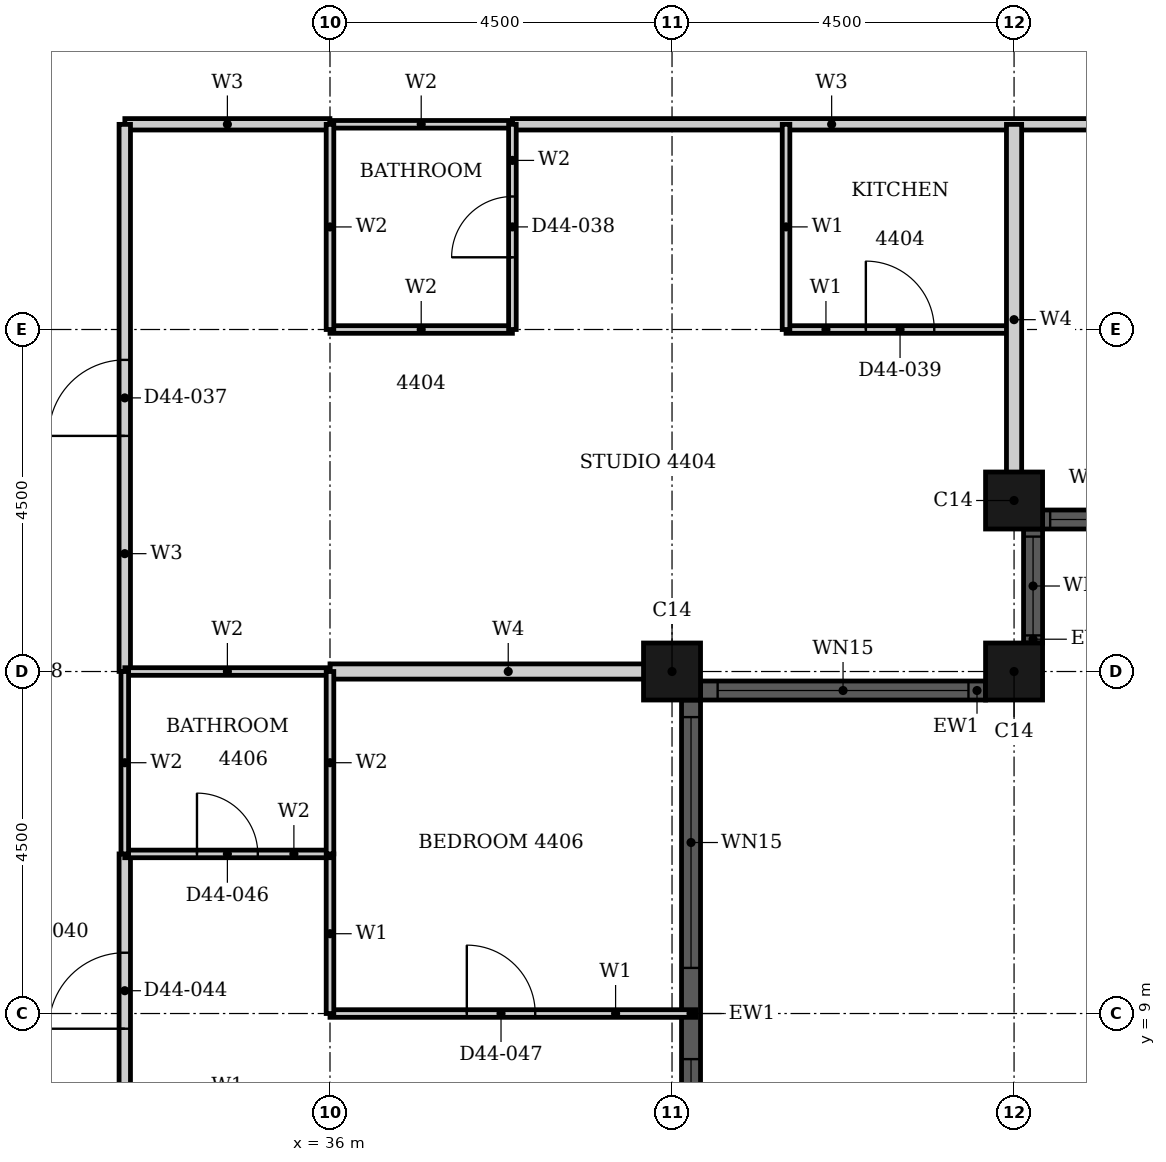
"""IFC4 building model, lengths in metres.
Left out: names, types, materials, properties, quantities, classifications, styles, units other than length and angle.
Written with IfcOpenShell. Run it as: python <this file> out.ifc"""

import sys

from ifc_helpers import new_model, si_unit, direction, frame, frame_2d, origin, origin_2d, place, context, subcontext, project, spatial, rectangle, hollow_rectangle, extrude, element, fill, save


model = new_model("IFC4")
c1 = context("Model", 3, precision=1e-05, world=origin(), true_north=direction((0.0, 1.0)))
c2 = subcontext(c1, "Body", "Model", "MODEL_VIEW")
j1 = project(units=[si_unit("LENGTHUNIT", "METRE"), si_unit("PLANEANGLEUNIT", "RADIAN")], contexts=[c1])
p1 = place(None, origin())
s1 = spatial("IfcSite", under=j1, at=p1, CompositionType="ELEMENT")
p2 = place(p1, origin())
s2 = spatial("IfcBuilding", under=s1, at=p2, CompositionType="ELEMENT")
p3 = place(p2, frame((0.0, 0.0, 176.5)))
s3 = spatial("IfcBuildingStorey", under=s2, at=p3, CompositionType="ELEMENT", Elevation=176.5)
for number, where, z_axis, x_axis in (
    (1, (40.5, 13.5, 0.0), (0.0, 0.0, 1.0), (1.0, 0.0, 0.0)),
    (2, (45.0, 13.5, 0.0), (0.0, 0.0, 1.0), (1.0, 0.0, 0.0)),
    (3, (45.0, 15.75, 0.0), (0.0, 0.0, 1.0), (1.0, 0.0, 0.0)),
):
    element("IfcColumn", number, at=place(p3, frame(where, z_axis=z_axis, x_axis=x_axis)), inside=s3, PredefinedType="COLUMN", context=c2, shape_type="SweptSolid", body=[
        extrude(hollow_rectangle(XDim=0.75, YDim=0.75, WallThickness=0.024, at=origin_2d()), origin(), (0.0, 0.0, 1.0), 3.7),
    ])
p4 = place(p3, frame((40.75, 4.875, 0.0), z_axis=(0.0, 0.0, 1.0), x_axis=(0.0, 1.0, 0.0)))
e4 = element("IfcWall", 4, at=p4, inside=s3, PredefinedType="SOLIDWALL", context=c2, shape_type="SweptSolid", body=[
    extrude(rectangle(XDim=8.25, YDim=0.25, at=frame_2d((4.125, 0.0))), origin(), (0.0, 0.0, 1.0), 3.7),
])
p5 = place(p4, frame((0.225, 0.0, 0.45)))
e5 = element("IfcOpeningElement", 5, at=p5, cuts=e4, PredefinedType="OPENING", context=c2, shape_type="SweptSolid", body=[
    extrude(rectangle(XDim=3.3, YDim=2.3, at=frame_2d((1.65, 1.15))), frame((0.0, 0.135, 0.0), z_axis=(0.0, -1.0, 0.0), x_axis=(1.0, 0.0, 0.0)), (0.0, 0.0, 1.0), 0.27),
])
p6 = place(p4, frame((4.725, 0.0, 0.45)))
e6 = element("IfcOpeningElement", 6, at=p6, cuts=e4, PredefinedType="OPENING", context=c2, shape_type="SweptSolid", body=[
    extrude(rectangle(XDim=3.3, YDim=2.3, at=frame_2d((1.65, 1.15))), frame((0.0, 0.135, 0.0), z_axis=(0.0, -1.0, 0.0), x_axis=(1.0, 0.0, 0.0)), (0.0, 0.0, 1.0), 0.27),
])
p7 = place(p3, frame((40.875, 13.25, 0.0), z_axis=(0.0, 0.0, 1.0), x_axis=(1.0, 0.0, 0.0)))
e7 = element("IfcWall", 7, at=p7, inside=s3, PredefinedType="SOLIDWALL", context=c2, shape_type="SweptSolid", body=[
    extrude(rectangle(XDim=3.75, YDim=0.25, at=frame_2d((1.875, 0.0))), origin(), (0.0, 0.0, 1.0), 3.7),
])
p8 = place(p7, frame((0.225, 0.0, 0.45)))
e8 = element("IfcOpeningElement", 8, at=p8, cuts=e7, PredefinedType="OPENING", context=c2, shape_type="SweptSolid", body=[
    extrude(rectangle(XDim=3.3, YDim=2.3, at=frame_2d((1.65, 1.15))), frame((0.0, 0.135, 0.0), z_axis=(0.0, -1.0, 0.0), x_axis=(1.0, 0.0, 0.0)), (0.0, 0.0, 1.0), 0.27),
])
p9 = place(p3, frame((45.25, 13.875, 0.0), z_axis=(0.0, 0.0, 1.0), x_axis=(0.0, 1.0, 0.0)))
e9 = element("IfcWall", 9, at=p9, inside=s3, PredefinedType="SOLIDWALL", context=c2, shape_type="SweptSolid", body=[
    extrude(rectangle(XDim=1.5, YDim=0.25, at=frame_2d((0.75, 0.0))), origin(), (0.0, 0.0, 1.0), 3.7),
])
p10 = place(p9, frame((0.1, 0.0, 0.9)))
e10 = element("IfcOpeningElement", 10, at=p10, cuts=e9, PredefinedType="OPENING", context=c2, shape_type="SweptSolid", body=[
    extrude(rectangle(XDim=1.3, YDim=1.85, at=frame_2d((0.65, 0.925))), frame((0.0, 0.135, 0.0), z_axis=(0.0, -1.0, 0.0), x_axis=(1.0, 0.0, 0.0)), (0.0, 0.0, 1.0), 0.27),
])
p11 = place(p3, frame((45.375, 15.5, 0.0), z_axis=(0.0, 0.0, 1.0), x_axis=(1.0, 0.0, 0.0)))
e11 = element("IfcWall", 11, at=p11, inside=s3, PredefinedType="SOLIDWALL", context=c2, shape_type="SweptSolid", body=[
    extrude(rectangle(XDim=1.5, YDim=0.25, at=frame_2d((0.75, 0.0))), origin(), (0.0, 0.0, 1.0), 3.7),
])
p12 = place(p11, frame((0.1, 0.0, 0.9)))
e12 = element("IfcOpeningElement", 12, at=p12, cuts=e11, PredefinedType="OPENING", context=c2, shape_type="SweptSolid", body=[
    extrude(rectangle(XDim=1.3, YDim=1.85, at=frame_2d((0.65, 0.925))), frame((0.0, 0.135, 0.0), z_axis=(0.0, -1.0, 0.0), x_axis=(1.0, 0.0, 0.0)), (0.0, 0.0, 1.0), 0.27),
])
p13 = place(p3, frame((33.301, 20.7, 0.0), z_axis=(0.0, 0.0, 1.0), x_axis=(1.0, 0.0, 0.0)))
e13 = element("IfcWall", 13, at=p13, inside=s3, PredefinedType="PARTITIONING", context=c2, shape_type="SweptSolid", body=[
    extrude(rectangle(XDim=2.698, YDim=0.15, at=frame_2d((1.349, 0.0))), origin(), (0.0, 0.0, 1.0), 3.4),
])
p14 = place(p3, frame((38.4, 20.7, 0.0), z_axis=(0.0, 0.0, 1.0), x_axis=(1.0, 0.0, 0.0)))
e14 = element("IfcWall", 14, at=p14, inside=s3, PredefinedType="PARTITIONING", context=c2, shape_type="SweptSolid", body=[
    extrude(rectangle(XDim=8.4, YDim=0.15, at=frame_2d((4.2, 0.0))), origin(), (0.0, 0.0, 1.0), 3.4),
])
p15 = place(p3, frame((33.3, 4.5, 0.0), z_axis=(0.0, 0.0, 1.0), x_axis=(0.0, 1.0, 0.0)))
e15 = element("IfcWall", 15, at=p15, inside=s3, PredefinedType="PARTITIONING", context=c2, shape_type="SweptSolid", body=[
    extrude(rectangle(XDim=6.6, YDim=0.15, at=frame_2d((3.3, 0.0))), origin(), (0.0, 0.0, 1.0), 3.4),
])
p16 = place(p15, frame((4.3, 0.0, 0.0)))
e16 = element("IfcOpeningElement", 16, at=p16, cuts=e15, PredefinedType="OPENING", context=c2, shape_type="SweptSolid", body=[
    extrude(rectangle(XDim=1.0, YDim=2.2, at=frame_2d((0.5, 1.1))), frame((0.0, 0.085, 0.0), z_axis=(0.0, -1.0, 0.0), x_axis=(1.0, 0.0, 0.0)), (0.0, 0.0, 1.0), 0.17),
])
p17 = place(p3, frame((33.3, 13.501, 0.0), z_axis=(0.0, 0.0, 1.0), x_axis=(0.0, 1.0, 0.0)))
e17 = element("IfcWall", 17, at=p17, inside=s3, PredefinedType="PARTITIONING", context=c2, shape_type="SweptSolid", body=[
    extrude(rectangle(XDim=7.198, YDim=0.15, at=frame_2d((3.599, 0.0))), origin(), (0.0, 0.0, 1.0), 3.4),
])
p18 = place(p17, frame((3.099, 0.0, 0.0)))
e18 = element("IfcOpeningElement", 18, at=p18, cuts=e17, PredefinedType="OPENING", context=c2, shape_type="SweptSolid", body=[
    extrude(rectangle(XDim=1.0, YDim=2.2, at=frame_2d((0.5, 1.1))), frame((0.0, 0.085, 0.0), z_axis=(0.0, -1.0, 0.0), x_axis=(1.0, 0.0, 0.0)), (0.0, 0.0, 1.0), 0.17),
])
p19 = place(p3, frame((42.0, 18.0, 0.0), z_axis=(0.0, 0.0, 1.0), x_axis=(1.0, 0.0, 0.0)))
e19 = element("IfcWall", 19, at=p19, inside=s3, PredefinedType="PARTITIONING", context=c2, shape_type="SweptSolid", body=[
    extrude(rectangle(XDim=3.0, YDim=0.1, at=frame_2d((1.5, 0.0))), origin(), (0.0, 0.0, 1.0), 3.4),
])
p20 = place(p19, frame((1.05, 0.0, 0.0)))
e20 = element("IfcOpeningElement", 20, at=p20, cuts=e19, PredefinedType="OPENING", context=c2, shape_type="SweptSolid", body=[
    extrude(rectangle(XDim=0.9, YDim=2.1, at=frame_2d((0.45, 1.05))), frame((0.0, 0.06, 0.0), z_axis=(0.0, -1.0, 0.0), x_axis=(1.0, 0.0, 0.0)), (0.0, 0.0, 1.0), 0.12),
])
p21 = place(p3, frame((36.0, 9.0, 0.0), z_axis=(0.0, 0.0, 1.0), x_axis=(1.0, 0.0, 0.0)))
e21 = element("IfcWall", 21, at=p21, inside=s3, PredefinedType="PARTITIONING", context=c2, shape_type="SweptSolid", body=[
    extrude(rectangle(XDim=4.815, YDim=0.1, at=frame_2d((2.407, 0.0))), origin(), (0.0, 0.0, 1.0), 3.4),
])
p22 = place(p21, frame((1.8, 0.0, 0.0)))
e22 = element("IfcOpeningElement", 22, at=p22, cuts=e21, PredefinedType="OPENING", context=c2, shape_type="SweptSolid", body=[
    extrude(rectangle(XDim=0.9, YDim=2.1, at=frame_2d((0.45, 1.05))), frame((0.0, 0.06, 0.0), z_axis=(0.0, -1.0, 0.0), x_axis=(1.0, 0.0, 0.0)), (0.0, 0.0, 1.0), 0.12),
])
p23 = place(p3, frame((36.0, 9.0, 0.0), z_axis=(0.0, 0.0, 1.0), x_axis=(0.0, 1.0, 0.0)))
e23 = element("IfcWall", 23, at=p23, inside=s3, PredefinedType="PARTITIONING", context=c2, shape_type="SweptSolid", body=[
    extrude(rectangle(XDim=2.1, YDim=0.1, at=frame_2d((1.05, 0.0))), origin(), (0.0, 0.0, 1.0), 2.68),
])
p24 = place(p3, frame((42.0, 18.0, 0.0), z_axis=(0.0, 0.0, 1.0), x_axis=(0.0, 1.0, 0.0)))
e24 = element("IfcWall", 24, at=p24, inside=s3, PredefinedType="PARTITIONING", context=c2, shape_type="SweptSolid", body=[
    extrude(rectangle(XDim=2.7, YDim=0.1, at=frame_2d((1.35, 0.0))), origin(), (0.0, 0.0, 1.0), 3.4),
])
p25 = place(p3, frame((36.0, 13.5, 0.0), z_axis=(0.0, 0.0, 1.0), x_axis=(1.0, 0.0, 0.0)))
e25 = element("IfcWall", 25, at=p25, inside=s3, PredefinedType="PARTITIONING", context=c2, shape_type="SweptSolid", body=[
    extrude(rectangle(XDim=4.69, YDim=0.2, at=frame_2d((2.345, 0.0))), origin(), (0.0, 0.0, 1.0), 2.48),
])
p26 = place(p3, frame((45.0, 15.56, 0.0), z_axis=(0.0, 0.0, 1.0), x_axis=(0.0, 1.0, 0.0)))
e26 = element("IfcWall", 26, at=p26, inside=s3, PredefinedType="PARTITIONING", context=c2, shape_type="SweptSolid", body=[
    extrude(rectangle(XDim=5.139, YDim=0.2, at=frame_2d((2.569, 0.0))), origin(), (0.0, 0.0, 1.0), 3.4),
])
p27 = place(p3, frame((33.3, 11.1, 0.0), z_axis=(0.0, 0.0, 1.0), x_axis=(1.0, 0.0, 0.0)))
e27 = element("IfcWall", 27, at=p27, inside=s3, PredefinedType="PARTITIONING", context=c2, shape_type="SweptSolid", body=[
    extrude(rectangle(XDim=2.7, YDim=0.1, at=frame_2d((1.35, 0.0))), origin(), (0.0, 0.0, 1.0), 3.4),
])
p28 = place(p27, frame((0.95, 0.0, 0.0)))
e28 = element("IfcOpeningElement", 28, at=p28, cuts=e27, PredefinedType="OPENING", context=c2, shape_type="SweptSolid", body=[
    extrude(rectangle(XDim=0.8, YDim=2.1, at=frame_2d((0.4, 1.05))), frame((0.0, 0.06, 0.0), z_axis=(0.0, -1.0, 0.0), x_axis=(1.0, 0.0, 0.0)), (0.0, 0.0, 1.0), 0.12),
])
p29 = place(p3, frame((33.301, 13.5, 0.0), z_axis=(0.0, 0.0, 1.0), x_axis=(1.0, 0.0, 0.0)))
e29 = element("IfcWall", 29, at=p29, inside=s3, PredefinedType="PARTITIONING", context=c2, shape_type="SweptSolid", body=[
    extrude(rectangle(XDim=2.698, YDim=0.1, at=frame_2d((1.349, 0.0))), origin(), (0.0, 0.0, 1.0), 2.48),
])
for number, where, z_axis, x_axis in (
    (30, (36.0, 18.0, 0.0), (0.0, 0.0, 1.0), (1.0, 0.0, 0.0)),
    (31, (36.0, 20.7, 0.0), (0.0, 0.0, 1.0), (1.0, 0.0, 0.0)),
    (32, (33.3, 11.1, 0.0), (0.0, 0.0, 1.0), (0.0, 1.0, 0.0)),
):
    element("IfcWall", number, at=place(p3, frame(where, z_axis=z_axis, x_axis=x_axis)), inside=s3, PredefinedType="PARTITIONING", context=c2, shape_type="SweptSolid", body=[
        extrude(rectangle(XDim=2.4, YDim=0.1, at=frame_2d((1.2, 0.0))), origin(), (0.0, 0.0, 1.0), 3.4),
    ])
p30 = place(p3, frame((36.0, 11.1, 0.0), z_axis=(0.0, 0.0, 1.0), x_axis=(0.0, 1.0, 0.0)))
e33 = element("IfcWall", 33, at=p30, inside=s3, PredefinedType="PARTITIONING", context=c2, shape_type="SweptSolid", body=[
    extrude(rectangle(XDim=2.4, YDim=0.1, at=frame_2d((1.2, 0.0))), origin(), (0.0, 0.0, 1.0), 2.68),
])
p31 = place(p3, frame((36.0, 18.0, 0.0), z_axis=(0.0, 0.0, 1.0), x_axis=(0.0, 1.0, 0.0)))
e34 = element("IfcWall", 34, at=p31, inside=s3, PredefinedType="PARTITIONING", context=c2, shape_type="SweptSolid", body=[
    extrude(rectangle(XDim=2.699, YDim=0.1, at=frame_2d((1.35, 0.0))), origin(), (0.0, 0.0, 1.0), 3.4),
])
p32 = place(p3, frame((38.4, 18.0, 0.0), z_axis=(0.0, 0.0, 1.0), x_axis=(0.0, 1.0, 0.0)))
e35 = element("IfcWall", 35, at=p32, inside=s3, PredefinedType="PARTITIONING", context=c2, shape_type="SweptSolid", body=[
    extrude(rectangle(XDim=2.7, YDim=0.1, at=frame_2d((1.35, 0.0))), origin(), (0.0, 0.0, 1.0), 3.4),
])
p33 = place(p32, frame((0.95, 0.0, 0.0)))
e36 = element("IfcOpeningElement", 36, at=p33, cuts=e35, PredefinedType="OPENING", context=c2, shape_type="SweptSolid", body=[
    extrude(rectangle(XDim=0.8, YDim=2.1, at=frame_2d((0.4, 1.05))), frame((0.0, 0.06, 0.0), z_axis=(0.0, -1.0, 0.0), x_axis=(1.0, 0.0, 0.0)), (0.0, 0.0, 1.0), 0.12),
])
p34 = place(p5, origin())
e37 = element("IfcWindow", 37, at=p34, inside=s3, PartitioningType="SINGLE_PANEL", PredefinedType="WINDOW", context=c2, shape_type="SweptSolid", body=[
    extrude(rectangle(XDim=3.3, YDim=2.3, at=frame_2d((1.65, 1.15))), frame((0.0, 0.03, 0.0), z_axis=(0.0, -1.0, 0.0), x_axis=(1.0, 0.0, 0.0)), (0.0, 0.0, 1.0), 0.06),
])
fill(e5, e37)
p35 = place(p6, origin())
e38 = element("IfcWindow", 38, at=p35, inside=s3, PartitioningType="SINGLE_PANEL", PredefinedType="WINDOW", context=c2, shape_type="SweptSolid", body=[
    extrude(rectangle(XDim=3.3, YDim=2.3, at=frame_2d((1.65, 1.15))), frame((0.0, 0.03, 0.0), z_axis=(0.0, -1.0, 0.0), x_axis=(1.0, 0.0, 0.0)), (0.0, 0.0, 1.0), 0.06),
])
fill(e6, e38)
p36 = place(p8, origin())
e39 = element("IfcWindow", 39, at=p36, inside=s3, PartitioningType="SINGLE_PANEL", PredefinedType="WINDOW", context=c2, shape_type="SweptSolid", body=[
    extrude(rectangle(XDim=3.3, YDim=2.3, at=frame_2d((1.65, 1.15))), frame((0.0, 0.03, 0.0), z_axis=(0.0, -1.0, 0.0), x_axis=(1.0, 0.0, 0.0)), (0.0, 0.0, 1.0), 0.06),
])
fill(e8, e39)
p37 = place(p10, origin())
e40 = element("IfcWindow", 40, at=p37, inside=s3, PartitioningType="SINGLE_PANEL", PredefinedType="WINDOW", context=c2, shape_type="SweptSolid", body=[
    extrude(rectangle(XDim=1.3, YDim=1.85, at=frame_2d((0.65, 0.925))), frame((0.0, 0.03, 0.0), z_axis=(0.0, -1.0, 0.0), x_axis=(1.0, 0.0, 0.0)), (0.0, 0.0, 1.0), 0.06),
])
fill(e10, e40)
p38 = place(p12, origin())
e41 = element("IfcWindow", 41, at=p38, inside=s3, PartitioningType="SINGLE_PANEL", PredefinedType="WINDOW", context=c2, shape_type="SweptSolid", body=[
    extrude(rectangle(XDim=1.3, YDim=1.85, at=frame_2d((0.65, 0.925))), frame((0.0, 0.03, 0.0), z_axis=(0.0, -1.0, 0.0), x_axis=(1.0, 0.0, 0.0)), (0.0, 0.0, 1.0), 0.06),
])
fill(e12, e41)
p39 = place(p18, origin())
e42 = element("IfcDoor", 42, at=p39, inside=s3, OperationType="SINGLE_SWING_RIGHT", PredefinedType="DOOR", context=c2, shape_type="SweptSolid", body=[
    extrude(rectangle(XDim=1.0, YDim=2.2, at=frame_2d((0.5, 1.1))), frame((0.0, 0.025, 0.0), z_axis=(0.0, -1.0, 0.0), x_axis=(1.0, 0.0, 0.0)), (0.0, 0.0, 1.0), 0.05),
])
fill(e18, e42)
p40 = place(p33, origin())
e43 = element("IfcDoor", 43, at=p40, inside=s3, OperationType="SINGLE_SWING_RIGHT", PredefinedType="DOOR", context=c2, shape_type="SweptSolid", body=[
    extrude(rectangle(XDim=0.8, YDim=2.1, at=frame_2d((0.4, 1.05))), frame((0.0, 0.025, 0.0), z_axis=(0.0, -1.0, 0.0), x_axis=(1.0, 0.0, 0.0)), (0.0, 0.0, 1.0), 0.05),
])
fill(e36, e43)
p41 = place(p20, origin())
e44 = element("IfcDoor", 44, at=p41, inside=s3, OperationType="SINGLE_SWING_LEFT", PredefinedType="DOOR", context=c2, shape_type="SweptSolid", body=[
    extrude(rectangle(XDim=0.9, YDim=2.1, at=frame_2d((0.45, 1.05))), frame((0.0, 0.025, 0.0), z_axis=(0.0, -1.0, 0.0), x_axis=(1.0, 0.0, 0.0)), (0.0, 0.0, 1.0), 0.05),
])
fill(e20, e44)
p42 = place(p16, origin())
e45 = element("IfcDoor", 45, at=p42, inside=s3, OperationType="SINGLE_SWING_RIGHT", PredefinedType="DOOR", context=c2, shape_type="SweptSolid", body=[
    extrude(rectangle(XDim=1.0, YDim=2.2, at=frame_2d((0.5, 1.1))), frame((0.0, 0.025, 0.0), z_axis=(0.0, -1.0, 0.0), x_axis=(1.0, 0.0, 0.0)), (0.0, 0.0, 1.0), 0.05),
])
fill(e16, e45)
p43 = place(p28, origin())
e46 = element("IfcDoor", 46, at=p43, inside=s3, OperationType="SINGLE_SWING_RIGHT", PredefinedType="DOOR", context=c2, shape_type="SweptSolid", body=[
    extrude(rectangle(XDim=0.8, YDim=2.1, at=frame_2d((0.4, 1.05))), frame((0.0, 0.025, 0.0), z_axis=(0.0, -1.0, 0.0), x_axis=(1.0, 0.0, 0.0)), (0.0, 0.0, 1.0), 0.05),
])
fill(e28, e46)
p44 = place(p22, origin())
e47 = element("IfcDoor", 47, at=p44, inside=s3, OperationType="SINGLE_SWING_RIGHT", PredefinedType="DOOR", context=c2, shape_type="SweptSolid", body=[
    extrude(rectangle(XDim=0.9, YDim=2.1, at=frame_2d((0.45, 1.05))), frame((0.0, 0.025, 0.0), z_axis=(0.0, -1.0, 0.0), x_axis=(1.0, 0.0, 0.0)), (0.0, 0.0, 1.0), 0.05),
])
fill(e22, e47)
save(model, sys.argv[1])
